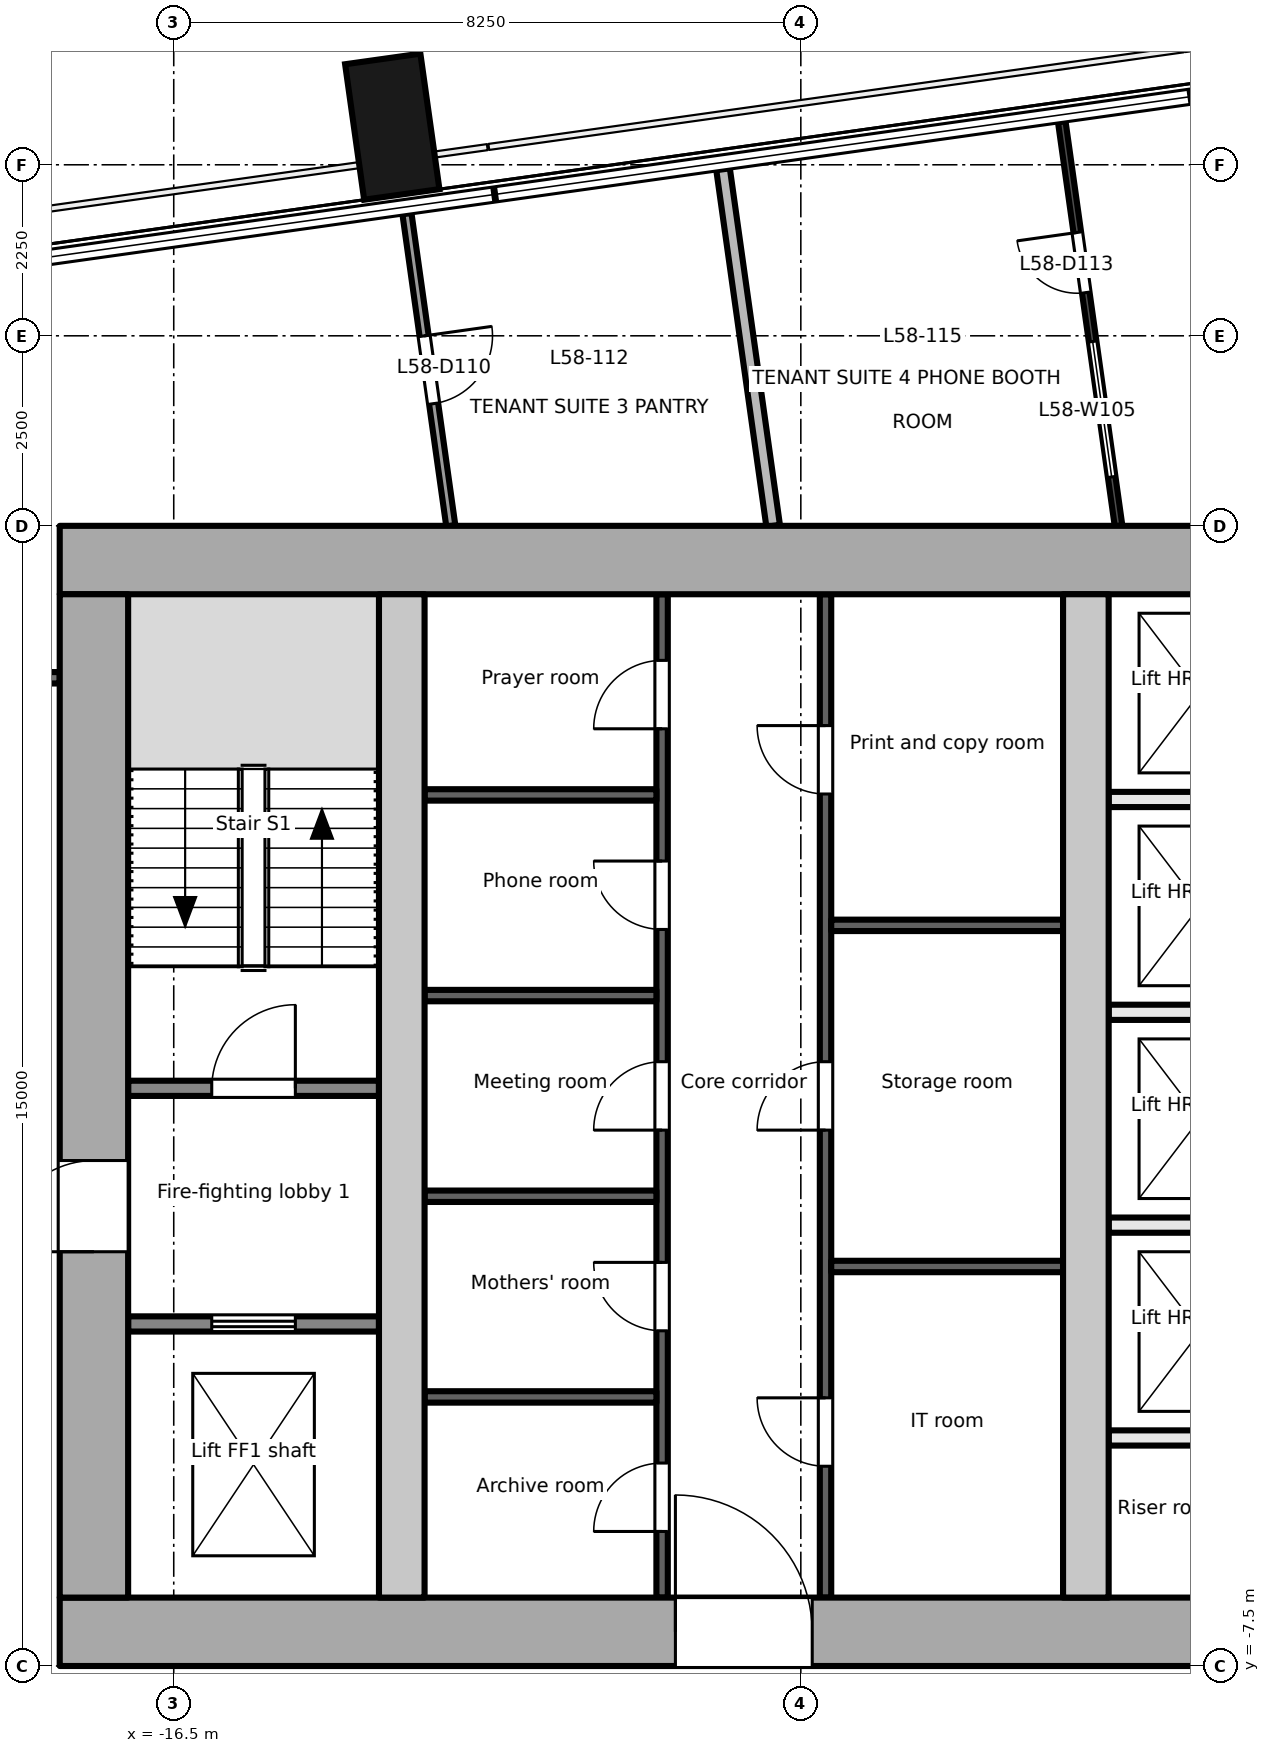
"""IFC4 building model, lengths in metres.
Left out: names, types, materials, properties, quantities, classifications, styles, units other than length and angle.
Written with IfcOpenShell. Run it as: python <this file> out.ifc"""

import sys

from ifc_helpers import new_model, si_unit, direction, frame, frame_2d, origin, origin_2d, place, context, subcontext, project, spatial, rectangle, extrude, element, fill, save


model = new_model("IFC4")
c1 = context("Model", 3, precision=1e-05, world=origin(), true_north=direction((0.0, 1.0)))
c2 = subcontext(c1, "Body", "Model", "MODEL_VIEW")
j1 = project(units=[si_unit("LENGTHUNIT", "METRE"), si_unit("PLANEANGLEUNIT", "RADIAN")], contexts=[c1])
p1 = place(None, origin())
s1 = spatial("IfcSite", under=j1, at=p1, CompositionType="ELEMENT")
p2 = place(p1, origin())
s2 = spatial("IfcBuilding", under=s1, at=p2, CompositionType="ELEMENT")
p3 = place(p2, frame((0.0, 0.0, 255.1)))
s3 = spatial("IfcBuildingStorey", under=s2, at=p3, CompositionType="ELEMENT", Elevation=255.1)
p4 = place(p3, frame((-13.625, 12.751, -0.2), z_axis=(0.0, 0.0, 1.0), x_axis=(0.990265639562, 0.139190384377, 0.0)))
e1 = element("IfcColumn", 1, at=p4, inside=s3, PredefinedType="COLUMN", context=c2, shape_type="SweptSolid", body=[
    extrude(rectangle(XDim=1.0, YDim=1.8, at=origin_2d()), origin(), (0.0, 0.0, 1.0), 3.9),
])
p5 = place(p3, frame((-18.0, -7.05, -0.2), z_axis=(0.0, 0.0, 1.0), x_axis=(1.0, 0.0, 0.0)))
e2 = element("IfcWall", 2, at=p5, inside=s3, PredefinedType="SHEAR", context=c2, shape_type="SweptSolid", body=[
    extrude(rectangle(XDim=36.0, YDim=0.9, at=frame_2d((18.0, 0.0))), origin(), (0.0, 0.0, 1.0), 3.9),
])
p6 = place(p5, frame((8.1, 0.0, 0.2)))
e3 = element("IfcOpeningElement", 3, at=p6, cuts=e2, PredefinedType="OPENING", context=c2, shape_type="SweptSolid", body=[
    extrude(rectangle(XDim=1.8, YDim=2.1, at=frame_2d((0.9, 1.05))), frame((0.0, 0.46, 0.0), z_axis=(0.0, -1.0, 0.0), x_axis=(1.0, 0.0, 0.0)), (0.0, 0.0, 1.0), 0.921),
])
p7 = place(p5, frame((16.8, 0.0, 0.2)))
e4 = element("IfcOpeningElement", 4, at=p7, cuts=e2, PredefinedType="OPENING", context=c2, shape_type="SweptSolid", body=[
    extrude(rectangle(XDim=2.4, YDim=2.1, at=frame_2d((1.2, 1.05))), frame((0.0, 0.46, 0.0), z_axis=(0.0, -1.0, 0.0), x_axis=(1.0, 0.0, 0.0)), (0.0, 0.0, 1.0), 0.921),
])
p8 = place(p5, frame((26.1, 0.0, 0.2)))
e5 = element("IfcOpeningElement", 5, at=p8, cuts=e2, PredefinedType="OPENING", context=c2, shape_type="SweptSolid", body=[
    extrude(rectangle(XDim=2.4, YDim=2.1, at=frame_2d((1.2, 1.05))), frame((0.0, 0.46, 0.0), z_axis=(0.0, -1.0, 0.0), x_axis=(1.0, 0.0, 0.0)), (0.0, 0.0, 1.0), 0.921),
])
p9 = place(p3, frame((-18.0, 7.05, -0.2), z_axis=(0.0, 0.0, 1.0), x_axis=(1.0, 0.0, 0.0)))
e6 = element("IfcWall", 6, at=p9, inside=s3, PredefinedType="SHEAR", context=c2, shape_type="SweptSolid", body=[
    extrude(rectangle(XDim=36.0, YDim=0.9, at=frame_2d((18.0, 0.0))), origin(), (0.0, 0.0, 1.0), 3.9),
])
p10 = place(p3, frame((-17.55, -6.6, -0.2), z_axis=(0.0, 0.0, 1.0), x_axis=(0.0, 1.0, 0.0)))
e7 = element("IfcWall", 7, at=p10, inside=s3, PredefinedType="SHEAR", context=c2, shape_type="SweptSolid", body=[
    extrude(rectangle(XDim=13.2, YDim=0.9, at=frame_2d((6.6, 0.0))), origin(), (0.0, 0.0, 1.0), 3.9),
])
p11 = place(p10, frame((4.55, 0.0, 0.2)))
e8 = element("IfcOpeningElement", 8, at=p11, cuts=e7, PredefinedType="OPENING", context=c2, shape_type="SweptSolid", body=[
    extrude(rectangle(XDim=1.2, YDim=2.1, at=frame_2d((0.6, 1.05))), frame((0.0, 0.46, 0.0), z_axis=(0.0, -1.0, 0.0), x_axis=(1.0, 0.0, 0.0)), (0.0, 0.0, 1.0), 0.921),
])
for number, where, z_axis, x_axis in (
    (9, (-13.5, -6.6, -0.2), (0.0, 0.0, 1.0), (0.0, 1.0, 0.0)),
    (10, (-4.5, -6.6, -0.2), (0.0, 0.0, 1.0), (0.0, 1.0, 0.0)),
):
    element("IfcWall", number, at=place(p3, frame(where, z_axis=z_axis, x_axis=x_axis)), inside=s3, PredefinedType="SHEAR", context=c2, shape_type="SweptSolid", body=[
        extrude(rectangle(XDim=13.2, YDim=0.6, at=frame_2d((6.6, 0.0))), origin(), (0.0, 0.0, 1.0), 3.9),
    ])
p12 = place(p3, frame((-17.1, -3.0, 0.0), z_axis=(0.0, 0.0, 1.0), x_axis=(1.0, 0.0, 0.0)))
e11 = element("IfcWall", 11, at=p12, inside=s3, PredefinedType="PARTITIONING", context=c2, shape_type="SweptSolid", body=[
    extrude(rectangle(XDim=3.3, YDim=0.2, at=frame_2d((1.65, 0.0))), origin(), (0.0, 0.0, 1.0), 3.7),
])
p13 = place(p12, frame((1.1, 0.0, 0.0)))
e12 = element("IfcOpeningElement", 12, at=p13, cuts=e11, PredefinedType="OPENING", context=c2, shape_type="SweptSolid", body=[
    extrude(rectangle(XDim=1.1, YDim=2.1, at=frame_2d((0.55, 1.05))), frame((0.0, 0.111, 0.0), z_axis=(0.0, -1.0, 0.0), x_axis=(1.0, 0.0, 0.0)), (0.0, 0.0, 1.0), 0.221),
])
p14 = place(p3, frame((-17.1, 0.1, 0.0), z_axis=(0.0, 0.0, 1.0), x_axis=(1.0, 0.0, 0.0)))
e13 = element("IfcWall", 13, at=p14, inside=s3, PredefinedType="PARTITIONING", context=c2, shape_type="SweptSolid", body=[
    extrude(rectangle(XDim=3.3, YDim=0.2, at=frame_2d((1.65, 0.0))), origin(), (0.0, 0.0, 1.0), 3.7),
])
p15 = place(p14, frame((1.1, 0.0, 0.0)))
e14 = element("IfcOpeningElement", 14, at=p15, cuts=e13, PredefinedType="OPENING", context=c2, shape_type="SweptSolid", body=[
    extrude(rectangle(XDim=1.1, YDim=2.1, at=frame_2d((0.55, 1.05))), frame((0.0, 0.111, 0.0), z_axis=(0.0, -1.0, 0.0), x_axis=(1.0, 0.0, 0.0)), (0.0, 0.0, 1.0), 0.221),
])
p16 = place(p3, frame((-10.075, -6.6, 0.0), z_axis=(0.0, 0.0, 1.0), x_axis=(0.0, 1.0, 0.0)))
e15 = element("IfcWall", 15, at=p16, inside=s3, PredefinedType="PARTITIONING", context=c2, shape_type="SweptSolid", body=[
    extrude(rectangle(XDim=13.2, YDim=0.15, at=frame_2d((6.6, 0.0))), origin(), (0.0, 0.0, 1.0), 3.7),
])
p17 = place(p16, frame((0.87, 0.0, 0.0)))
e16 = element("IfcOpeningElement", 16, at=p17, cuts=e15, PredefinedType="OPENING", context=c2, shape_type="SweptSolid", body=[
    extrude(rectangle(XDim=0.9, YDim=2.1, at=frame_2d((0.45, 1.05))), frame((0.0, 0.085, 0.0), z_axis=(0.0, -1.0, 0.0), x_axis=(1.0, 0.0, 0.0)), (0.0, 0.0, 1.0), 0.171),
])
p18 = place(p16, frame((3.51, 0.0, 0.0)))
e17 = element("IfcOpeningElement", 17, at=p18, cuts=e15, PredefinedType="OPENING", context=c2, shape_type="SweptSolid", body=[
    extrude(rectangle(XDim=0.9, YDim=2.1, at=frame_2d((0.45, 1.05))), frame((0.0, 0.085, 0.0), z_axis=(0.0, -1.0, 0.0), x_axis=(1.0, 0.0, 0.0)), (0.0, 0.0, 1.0), 0.171),
])
p19 = place(p16, frame((6.15, 0.0, 0.0)))
e18 = element("IfcOpeningElement", 18, at=p19, cuts=e15, PredefinedType="OPENING", context=c2, shape_type="SweptSolid", body=[
    extrude(rectangle(XDim=0.9, YDim=2.1, at=frame_2d((0.45, 1.05))), frame((0.0, 0.085, 0.0), z_axis=(0.0, -1.0, 0.0), x_axis=(1.0, 0.0, 0.0)), (0.0, 0.0, 1.0), 0.171),
])
p20 = place(p16, frame((8.79, 0.0, 0.0)))
e19 = element("IfcOpeningElement", 19, at=p20, cuts=e15, PredefinedType="OPENING", context=c2, shape_type="SweptSolid", body=[
    extrude(rectangle(XDim=0.9, YDim=2.1, at=frame_2d((0.45, 1.05))), frame((0.0, 0.085, 0.0), z_axis=(0.0, -1.0, 0.0), x_axis=(1.0, 0.0, 0.0)), (0.0, 0.0, 1.0), 0.171),
])
p21 = place(p16, frame((11.43, 0.0, 0.0)))
e20 = element("IfcOpeningElement", 20, at=p21, cuts=e15, PredefinedType="OPENING", context=c2, shape_type="SweptSolid", body=[
    extrude(rectangle(XDim=0.9, YDim=2.1, at=frame_2d((0.45, 1.05))), frame((0.0, 0.085, 0.0), z_axis=(0.0, -1.0, 0.0), x_axis=(1.0, 0.0, 0.0)), (0.0, 0.0, 1.0), 0.171),
])
for number, where, z_axis, x_axis in (
    (21, (-13.2, -3.96, 0.0), (0.0, 0.0, 1.0), (1.0, 0.0, 0.0)),
    (22, (-13.2, -1.32, 0.0), (0.0, 0.0, 1.0), (1.0, 0.0, 0.0)),
    (23, (-13.2, 1.32, 0.0), (0.0, 0.0, 1.0), (1.0, 0.0, 0.0)),
    (24, (-13.2, 3.96, 0.0), (0.0, 0.0, 1.0), (1.0, 0.0, 0.0)),
):
    element("IfcWall", number, at=place(p3, frame(where, z_axis=z_axis, x_axis=x_axis)), inside=s3, PredefinedType="PARTITIONING", context=c2, shape_type="SweptSolid", body=[
        extrude(rectangle(XDim=3.05, YDim=0.15, at=frame_2d((1.525, 0.0))), origin(), (0.0, 0.0, 1.0), 3.7),
    ])
p22 = place(p3, frame((-7.925, -6.6, 0.0), z_axis=(0.0, 0.0, 1.0), x_axis=(0.0, 1.0, 0.0)))
e25 = element("IfcWall", 25, at=p22, inside=s3, PredefinedType="PARTITIONING", context=c2, shape_type="SweptSolid", body=[
    extrude(rectangle(XDim=13.2, YDim=0.15, at=frame_2d((6.6, 0.0))), origin(), (0.0, 0.0, 1.0), 3.7),
])
p23 = place(p22, frame((1.728, 0.0, 0.0)))
e26 = element("IfcOpeningElement", 26, at=p23, cuts=e25, PredefinedType="OPENING", context=c2, shape_type="SweptSolid", body=[
    extrude(rectangle(XDim=0.9, YDim=2.1, at=frame_2d((0.45, 1.05))), frame((0.0, 0.085, 0.0), z_axis=(0.0, -1.0, 0.0), x_axis=(1.0, 0.0, 0.0)), (0.0, 0.0, 1.0), 0.171),
])
p24 = place(p22, frame((6.15, 0.0, 0.0)))
e27 = element("IfcOpeningElement", 27, at=p24, cuts=e25, PredefinedType="OPENING", context=c2, shape_type="SweptSolid", body=[
    extrude(rectangle(XDim=0.9, YDim=2.1, at=frame_2d((0.45, 1.05))), frame((0.0, 0.085, 0.0), z_axis=(0.0, -1.0, 0.0), x_axis=(1.0, 0.0, 0.0)), (0.0, 0.0, 1.0), 0.171),
])
p25 = place(p22, frame((10.572, 0.0, 0.0)))
e28 = element("IfcOpeningElement", 28, at=p25, cuts=e25, PredefinedType="OPENING", context=c2, shape_type="SweptSolid", body=[
    extrude(rectangle(XDim=0.9, YDim=2.1, at=frame_2d((0.45, 1.05))), frame((0.0, 0.085, 0.0), z_axis=(0.0, -1.0, 0.0), x_axis=(1.0, 0.0, 0.0)), (0.0, 0.0, 1.0), 0.171),
])
for number, where, z_axis, x_axis in (
    (29, (-7.85, -2.244, 0.0), (0.0, 0.0, 1.0), (1.0, 0.0, 0.0)),
    (30, (-7.85, 2.244, 0.0), (0.0, 0.0, 1.0), (1.0, 0.0, 0.0)),
):
    element("IfcWall", number, at=place(p3, frame(where, z_axis=z_axis, x_axis=x_axis)), inside=s3, PredefinedType="PARTITIONING", context=c2, shape_type="SweptSolid", body=[
        extrude(rectangle(XDim=3.05, YDim=0.15, at=frame_2d((1.525, 0.0))), origin(), (0.0, 0.0, 1.0), 3.7),
    ])
for number, where, z_axis, x_axis in (
    (31, (-4.2, -1.7, 0.0), (0.0, 0.0, 1.0), (1.0, 0.0, 0.0)),
    (32, (-4.2, 1.1, 0.0), (0.0, 0.0, 1.0), (1.0, 0.0, 0.0)),
    (33, (-4.2, 3.9, 0.0), (0.0, 0.0, 1.0), (1.0, 0.0, 0.0)),
    (34, (-4.2, -4.5, 0.0), (0.0, 0.0, 1.0), (1.0, 0.0, 0.0)),
):
    element("IfcWall", number, at=place(p3, frame(where, z_axis=z_axis, x_axis=x_axis)), inside=s3, PredefinedType="PARTITIONING", context=c2, shape_type="SweptSolid", body=[
        extrude(rectangle(XDim=2.3, YDim=0.2, at=frame_2d((1.15, 0.0))), origin(), (0.0, 0.0, 1.0), 3.7),
    ])
p26 = place(p3, frame((-20.325, 5.501, 0.0), z_axis=(0.0, 0.0, 1.0), x_axis=(1.0, 0.0, 0.0)))
e35 = element("IfcWall", 35, at=p26, inside=s3, PredefinedType="PARTITIONING", context=c2, shape_type="SweptSolid", body=[
    extrude(rectangle(XDim=2.325, YDim=0.15, at=frame_2d((1.163, 0.0))), origin(), (0.0, 0.0, 1.0), 3.7),
])
p27 = place(p3, frame((-13.432, 11.607, 0.0), z_axis=(0.0, 0.0, 1.0), x_axis=(0.139105101842, -0.990277623014, 0.0)))
e36 = element("IfcWall", 36, at=p27, inside=s3, PredefinedType="PARTITIONING", context=c2, shape_type="SweptSolid", body=[
    extrude(rectangle(XDim=4.147, YDim=0.12, at=frame_2d((2.074, 0.0))), origin(), (0.0, 0.0, 1.0), 3.4),
])
p28 = place(p27, frame((1.624, 0.0, 0.0)))
e37 = element("IfcOpeningElement", 37, at=p28, cuts=e36, PredefinedType="OPENING", context=c2, shape_type="SweptSolid", body=[
    extrude(rectangle(XDim=0.9, YDim=2.1, at=frame_2d((0.45, 1.05))), frame((0.0, 0.071, 0.0), z_axis=(0.0, -1.0, 0.0), x_axis=(1.0, 0.0, 0.0)), (0.0, 0.0, 1.0), 0.141),
])
p29 = place(p3, frame((-9.273, 12.191, 0.0), z_axis=(0.0, 0.0, 1.0), x_axis=(0.139104789371, -0.990277666907, 0.0)))
e38 = element("IfcWall", 38, at=p29, inside=s3, PredefinedType="PARTITIONING", context=c2, shape_type="SweptSolid", body=[
    extrude(rectangle(XDim=4.737, YDim=0.18, at=frame_2d((2.369, 0.0))), origin(), (0.0, 0.0, 1.0), 3.4),
])
p30 = place(p3, frame((-4.07, 7.5, 0.0), z_axis=(0.0, 0.0, 1.0), x_axis=(-0.139122430522, 0.990275188685, 0.0)))
e39 = element("IfcWall", 39, at=p30, inside=s3, PredefinedType="PARTITIONING", context=c2, shape_type="SweptSolid", body=[
    extrude(rectangle(XDim=5.368, YDim=0.1, at=frame_2d((2.684, 0.0))), origin(), (0.0, 0.0, 1.0), 3.4),
])
p31 = place(p30, frame((3.098, 0.0, 0.0)))
e40 = element("IfcOpeningElement", 40, at=p31, cuts=e39, PredefinedType="OPENING", context=c2, shape_type="SweptSolid", body=[
    extrude(rectangle(XDim=0.8, YDim=2.1, at=frame_2d((0.4, 1.05))), frame((0.0, 0.061, 0.0), z_axis=(0.0, -1.0, 0.0), x_axis=(1.0, 0.0, 0.0)), (0.0, 0.0, 1.0), 0.121),
])
p32 = place(p30, frame((0.649, 0.0, 0.9)))
e41 = element("IfcOpeningElement", 41, at=p32, cuts=e39, PredefinedType="OPENING", context=c2, shape_type="SweptSolid", body=[
    extrude(rectangle(XDim=1.8, YDim=1.2, at=frame_2d((0.9, 0.6))), frame((0.0, 0.061, 0.0), z_axis=(0.0, -1.0, 0.0), x_axis=(1.0, 0.0, 0.0)), (0.0, 0.0, 1.0), 0.121),
])
p33 = place(p13, origin())
e42 = element("IfcDoor", 42, at=p33, inside=s3, OperationType="DOUBLE_DOOR_SLIDING", PredefinedType="DOOR", context=c2, shape_type="SweptSolid", body=[
    extrude(rectangle(XDim=1.1, YDim=2.1, at=frame_2d((0.55, 1.05))), frame((0.0, 0.025, 0.0), z_axis=(0.0, -1.0, 0.0), x_axis=(1.0, 0.0, 0.0)), (0.0, 0.0, 1.0), 0.05),
])
fill(e12, e42)
p34 = place(p11, origin())
e43 = element("IfcDoor", 43, at=p34, inside=s3, OperationType="SINGLE_SWING_LEFT", PredefinedType="DOOR", context=c2, shape_type="SweptSolid", body=[
    extrude(rectangle(XDim=1.2, YDim=2.1, at=frame_2d((0.6, 1.05))), frame((0.0, 0.025, 0.0), z_axis=(0.0, -1.0, 0.0), x_axis=(1.0, 0.0, 0.0)), (0.0, 0.0, 1.0), 0.05),
])
fill(e8, e43)
p35 = place(p15, origin())
e44 = element("IfcDoor", 44, at=p35, inside=s3, OperationType="SINGLE_SWING_RIGHT", PredefinedType="DOOR", context=c2, shape_type="SweptSolid", body=[
    extrude(rectangle(XDim=1.1, YDim=2.1, at=frame_2d((0.55, 1.05))), frame((0.0, 0.025, 0.0), z_axis=(0.0, -1.0, 0.0), x_axis=(1.0, 0.0, 0.0)), (0.0, 0.0, 1.0), 0.05),
])
fill(e14, e44)
p36 = place(p17, origin())
e45 = element("IfcDoor", 45, at=p36, inside=s3, OperationType="SINGLE_SWING_LEFT", PredefinedType="DOOR", context=c2, shape_type="SweptSolid", body=[
    extrude(rectangle(XDim=0.9, YDim=2.1, at=frame_2d((0.45, 1.05))), frame((0.0, 0.025, 0.0), z_axis=(0.0, -1.0, 0.0), x_axis=(1.0, 0.0, 0.0)), (0.0, 0.0, 1.0), 0.05),
])
fill(e16, e45)
p37 = place(p18, origin())
e46 = element("IfcDoor", 46, at=p37, inside=s3, OperationType="SINGLE_SWING_RIGHT", PredefinedType="DOOR", context=c2, shape_type="SweptSolid", body=[
    extrude(rectangle(XDim=0.9, YDim=2.1, at=frame_2d((0.45, 1.05))), frame((0.0, 0.025, 0.0), z_axis=(0.0, -1.0, 0.0), x_axis=(1.0, 0.0, 0.0)), (0.0, 0.0, 1.0), 0.05),
])
fill(e17, e46)
p38 = place(p19, origin())
e47 = element("IfcDoor", 47, at=p38, inside=s3, OperationType="SINGLE_SWING_LEFT", PredefinedType="DOOR", context=c2, shape_type="SweptSolid", body=[
    extrude(rectangle(XDim=0.9, YDim=2.1, at=frame_2d((0.45, 1.05))), frame((0.0, 0.025, 0.0), z_axis=(0.0, -1.0, 0.0), x_axis=(1.0, 0.0, 0.0)), (0.0, 0.0, 1.0), 0.05),
])
fill(e18, e47)
p39 = place(p20, origin())
e48 = element("IfcDoor", 48, at=p39, inside=s3, OperationType="SINGLE_SWING_RIGHT", PredefinedType="DOOR", context=c2, shape_type="SweptSolid", body=[
    extrude(rectangle(XDim=0.9, YDim=2.1, at=frame_2d((0.45, 1.05))), frame((0.0, 0.025, 0.0), z_axis=(0.0, -1.0, 0.0), x_axis=(1.0, 0.0, 0.0)), (0.0, 0.0, 1.0), 0.05),
])
fill(e19, e48)
p40 = place(p21, origin())
e49 = element("IfcDoor", 49, at=p40, inside=s3, OperationType="SINGLE_SWING_LEFT", PredefinedType="DOOR", context=c2, shape_type="SweptSolid", body=[
    extrude(rectangle(XDim=0.9, YDim=2.1, at=frame_2d((0.45, 1.05))), frame((0.0, 0.025, 0.0), z_axis=(0.0, -1.0, 0.0), x_axis=(1.0, 0.0, 0.0)), (0.0, 0.0, 1.0), 0.05),
])
fill(e20, e49)
p41 = place(p23, origin())
e50 = element("IfcDoor", 50, at=p41, inside=s3, OperationType="SINGLE_SWING_RIGHT", PredefinedType="DOOR", context=c2, shape_type="SweptSolid", body=[
    extrude(rectangle(XDim=0.9, YDim=2.1, at=frame_2d((0.45, 1.05))), frame((0.0, 0.025, 0.0), z_axis=(0.0, -1.0, 0.0), x_axis=(1.0, 0.0, 0.0)), (0.0, 0.0, 1.0), 0.05),
])
fill(e26, e50)
p42 = place(p24, origin())
e51 = element("IfcDoor", 51, at=p42, inside=s3, OperationType="SINGLE_SWING_LEFT", PredefinedType="DOOR", context=c2, shape_type="SweptSolid", body=[
    extrude(rectangle(XDim=0.9, YDim=2.1, at=frame_2d((0.45, 1.05))), frame((0.0, 0.025, 0.0), z_axis=(0.0, -1.0, 0.0), x_axis=(1.0, 0.0, 0.0)), (0.0, 0.0, 1.0), 0.05),
])
fill(e27, e51)
p43 = place(p25, origin())
e52 = element("IfcDoor", 52, at=p43, inside=s3, OperationType="SINGLE_SWING_RIGHT", PredefinedType="DOOR", context=c2, shape_type="SweptSolid", body=[
    extrude(rectangle(XDim=0.9, YDim=2.1, at=frame_2d((0.45, 1.05))), frame((0.0, 0.025, 0.0), z_axis=(0.0, -1.0, 0.0), x_axis=(1.0, 0.0, 0.0)), (0.0, 0.0, 1.0), 0.05),
])
fill(e28, e52)
p44 = place(p6, origin())
e53 = element("IfcDoor", 53, at=p44, inside=s3, OperationType="SINGLE_SWING_LEFT", PredefinedType="DOOR", context=c2, shape_type="SweptSolid", body=[
    extrude(rectangle(XDim=1.8, YDim=2.1, at=frame_2d((0.9, 1.05))), frame((0.0, 0.025, 0.0), z_axis=(0.0, -1.0, 0.0), x_axis=(1.0, 0.0, 0.0)), (0.0, 0.0, 1.0), 0.05),
])
fill(e3, e53)
p45 = place(p28, origin())
e54 = element("IfcDoor", 54, at=p45, inside=s3, OperationType="SINGLE_SWING_LEFT", PredefinedType="DOOR", context=c2, shape_type="SweptSolid", body=[
    extrude(rectangle(XDim=0.9, YDim=2.1, at=frame_2d((0.45, 1.05))), frame((0.0, 0.025, 0.0), z_axis=(0.0, -1.0, 0.0), x_axis=(1.0, 0.0, 0.0)), (0.0, 0.0, 1.0), 0.05),
])
fill(e37, e54)
p46 = place(p31, origin())
e55 = element("IfcDoor", 55, at=p46, inside=s3, OperationType="SINGLE_SWING_RIGHT", PredefinedType="DOOR", context=c2, shape_type="SweptSolid", body=[
    extrude(rectangle(XDim=0.8, YDim=2.1, at=frame_2d((0.4, 1.05))), frame((0.0, 0.025, 0.0), z_axis=(0.0, -1.0, 0.0), x_axis=(1.0, 0.0, 0.0)), (0.0, 0.0, 1.0), 0.05),
])
fill(e40, e55)
p47 = place(p32, origin())
e56 = element("IfcWindow", 56, at=p47, inside=s3, PartitioningType="SINGLE_PANEL", PredefinedType="WINDOW", context=c2, shape_type="SweptSolid", body=[
    extrude(rectangle(XDim=1.8, YDim=1.2, at=frame_2d((0.9, 0.6))), frame((0.0, 0.03, 0.0), z_axis=(0.0, -1.0, 0.0), x_axis=(1.0, 0.0, 0.0)), (0.0, 0.0, 1.0), 0.06),
])
fill(e41, e56)
save(model, sys.argv[1])
